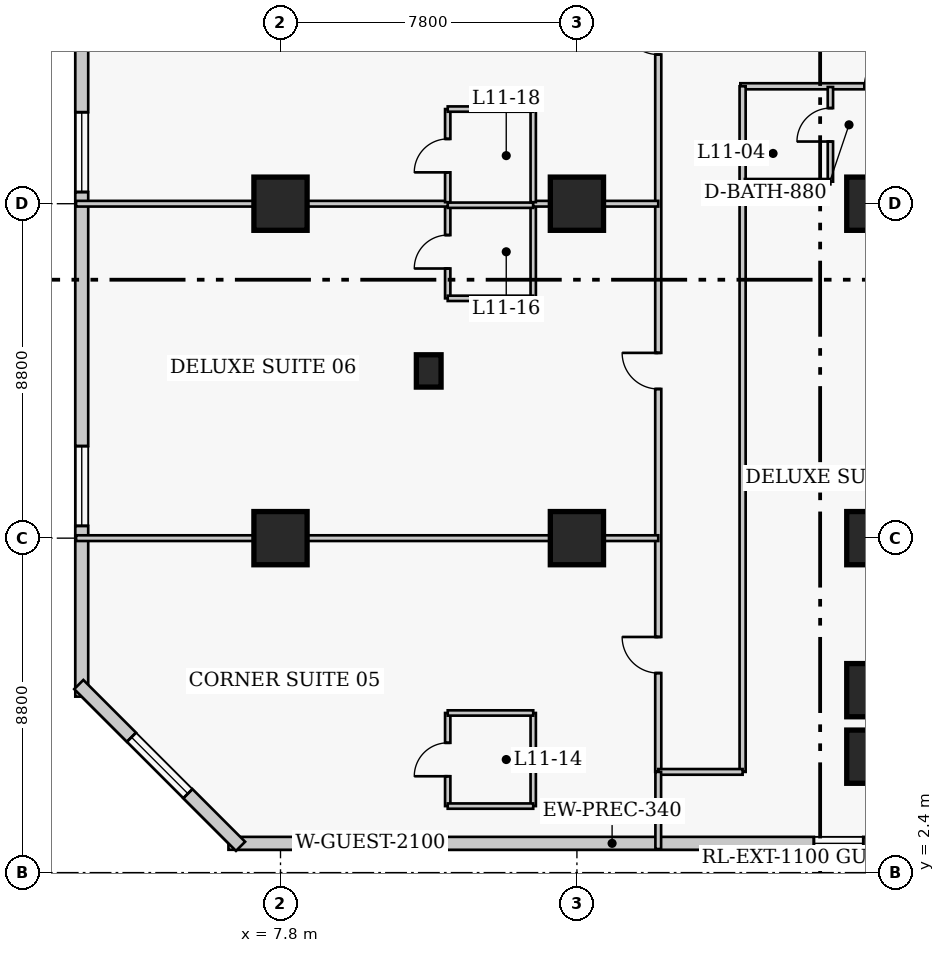
"""IFC4 building model, lengths in metres.
Left out: names, types, materials, properties, quantities, classifications, styles, units other than length and angle.
Written with IfcOpenShell. Run it as: python <this file> out.ifc"""

import sys

from ifc_helpers import new_model, si_unit, direction, frame, frame_2d, origin, origin_2d, place, context, subcontext, project, spatial, rectangle, extrude, element, fill, save


model = new_model("IFC4")
c1 = context("Model", 3, precision=1e-05, world=origin(), true_north=direction((0.0, 1.0)))
c2 = subcontext(c1, "Body", "Model", "MODEL_VIEW")
j1 = project(units=[si_unit("LENGTHUNIT", "METRE"), si_unit("PLANEANGLEUNIT", "RADIAN")], contexts=[c1])
p1 = place(None, origin())
s1 = spatial("IfcSite", under=j1, at=p1, CompositionType="ELEMENT")
p2 = place(p1, origin())
s2 = spatial("IfcBuilding", under=s1, at=p2, CompositionType="ELEMENT")
p3 = place(p2, frame((0.0, 0.0, 48.8)))
s3 = spatial("IfcBuildingStorey", under=s2, at=p3, CompositionType="ELEMENT", Elevation=48.8)
for number, where, z_axis, x_axis in (
    (1, (7.8, 11.2, 0.0), (0.0, 0.0, 1.0), (1.0, 0.0, 0.0)),
    (2, (7.8, 20.0, 0.0), (0.0, 0.0, 1.0), (1.0, 0.0, 0.0)),
    (3, (15.6, 11.2, 0.0), (0.0, 0.0, 1.0), (1.0, 0.0, 0.0)),
    (4, (15.6, 20.0, 0.0), (0.0, 0.0, 1.0), (1.0, 0.0, 0.0)),
    (5, (23.4, 11.2, 0.0), (0.0, 0.0, 1.0), (1.0, 0.0, 0.0)),
    (6, (23.4, 20.0, 0.0), (0.0, 0.0, 1.0), (1.0, 0.0, 0.0)),
    (7, (23.4, 7.2, 0.0), (0.0, 0.0, 1.0), (1.0, 0.0, 0.0)),
    (8, (23.4, 5.45, 0.0), (0.0, 0.0, 1.0), (1.0, 0.0, 0.0)),
):
    element("IfcColumn", number, at=place(p3, frame(where, z_axis=z_axis, x_axis=x_axis)), inside=s3, PredefinedType="COLUMN", context=c2, shape_type="SweptSolid", body=[
        extrude(rectangle(XDim=1.4, YDim=1.4, at=origin_2d()), origin(), (0.0, 0.0, 1.0), 3.8),
    ])
p4 = place(p3, frame((11.7, 15.6, 0.0), z_axis=(0.0, 0.0, 1.0), x_axis=(1.0, 0.0, 0.0)))
e9 = element("IfcColumn", 9, at=p4, inside=s3, PredefinedType="PILASTER", context=c2, shape_type="SweptSolid", body=[
    extrude(rectangle(XDim=0.65, YDim=0.85, at=origin_2d()), origin(), (0.0, 0.0, 1.0), 3.8),
])
p5 = place(p3, frame((6.43, 3.17, 0.0), z_axis=(0.0, 0.0, 1.0), x_axis=(1.0, 0.0, 0.0)))
e10 = element("IfcWall", 10, at=p5, inside=s3, PredefinedType="SOLIDWALL", context=c2, shape_type="SweptSolid", body=[
    extrude(rectangle(XDim=29.89, YDim=0.34, at=frame_2d((14.945, 0.0))), origin(), (0.0, 0.0, 1.0), 3.54),
])
p6 = place(p5, frame((20.17, 0.0, 0.0)))
e11 = element("IfcOpeningElement", 11, at=p6, cuts=e10, PredefinedType="OPENING", context=c2, shape_type="SweptSolid", body=[
    extrude(rectangle(XDim=1.4, YDim=2.15, at=frame_2d((0.7, 1.075))), frame((0.0, 0.18, 0.0), z_axis=(0.0, -1.0, 0.0), x_axis=(1.0, 0.0, 0.0)), (0.0, 0.0, 1.0), 0.36),
])
p7 = place(p5, frame((2.686, 0.0, 0.85)))
e12 = element("IfcOpeningElement", 12, at=p7, cuts=e10, PredefinedType="OPENING", context=c2, shape_type="SweptSolid", body=[
    extrude(rectangle(XDim=2.1, YDim=1.85, at=frame_2d((1.05, 0.925))), frame((0.0, 0.18, 0.0), z_axis=(0.0, -1.0, 0.0), x_axis=(1.0, 0.0, 0.0)), (0.0, 0.0, 1.0), 0.36),
])
p8 = place(p5, frame((25.104, 0.0, 0.85)))
e13 = element("IfcOpeningElement", 13, at=p8, cuts=e10, PredefinedType="OPENING", context=c2, shape_type="SweptSolid", body=[
    extrude(rectangle(XDim=2.1, YDim=1.85, at=frame_2d((1.05, 0.925))), frame((0.0, 0.18, 0.0), z_axis=(0.0, -1.0, 0.0), x_axis=(1.0, 0.0, 0.0)), (0.0, 0.0, 1.0), 0.36),
])
p9 = place(p5, frame((15.405, 0.0, 0.85)))
e14 = element("IfcOpeningElement", 14, at=p9, cuts=e10, PredefinedType="OPENING", context=c2, shape_type="SweptSolid", body=[
    extrude(rectangle(XDim=1.3, YDim=1.7, at=frame_2d((0.65, 0.85))), frame((0.0, 0.18, 0.0), z_axis=(0.0, -1.0, 0.0), x_axis=(1.0, 0.0, 0.0)), (0.0, 0.0, 1.0), 0.36),
])
p10 = place(p3, frame((2.57, 42.17, 0.0), z_axis=(0.0, 0.0, 1.0), x_axis=(0.0, -1.0, 0.0)))
e15 = element("IfcWall", 15, at=p10, inside=s3, PredefinedType="SOLIDWALL", context=c2, shape_type="SweptSolid", body=[
    extrude(rectangle(XDim=35.14, YDim=0.34, at=frame_2d((17.57, 0.0))), origin(), (0.0, 0.0, 1.0), 3.54),
])
p11 = place(p10, frame((2.692, 0.0, 0.85)))
e16 = element("IfcOpeningElement", 16, at=p11, cuts=e15, PredefinedType="OPENING", context=c2, shape_type="SweptSolid", body=[
    extrude(rectangle(XDim=2.1, YDim=1.85, at=frame_2d((1.05, 0.925))), frame((0.0, 0.18, 0.0), z_axis=(0.0, -1.0, 0.0), x_axis=(1.0, 0.0, 0.0)), (0.0, 0.0, 1.0), 0.36),
])
p12 = place(p10, frame((10.978, 0.0, 0.85)))
e17 = element("IfcOpeningElement", 17, at=p12, cuts=e15, PredefinedType="OPENING", context=c2, shape_type="SweptSolid", body=[
    extrude(rectangle(XDim=2.1, YDim=1.85, at=frame_2d((1.05, 0.925))), frame((0.0, 0.18, 0.0), z_axis=(0.0, -1.0, 0.0), x_axis=(1.0, 0.0, 0.0)), (0.0, 0.0, 1.0), 0.36),
])
p13 = place(p10, frame((19.762, 0.0, 0.85)))
e18 = element("IfcOpeningElement", 18, at=p13, cuts=e15, PredefinedType="OPENING", context=c2, shape_type="SweptSolid", body=[
    extrude(rectangle(XDim=2.1, YDim=1.85, at=frame_2d((1.05, 0.925))), frame((0.0, 0.18, 0.0), z_axis=(0.0, -1.0, 0.0), x_axis=(1.0, 0.0, 0.0)), (0.0, 0.0, 1.0), 0.36),
])
p14 = place(p10, frame((28.548, 0.0, 0.85)))
e19 = element("IfcOpeningElement", 19, at=p14, cuts=e15, PredefinedType="OPENING", context=c2, shape_type="SweptSolid", body=[
    extrude(rectangle(XDim=2.1, YDim=1.85, at=frame_2d((1.05, 0.925))), frame((0.0, 0.18, 0.0), z_axis=(0.0, -1.0, 0.0), x_axis=(1.0, 0.0, 0.0)), (0.0, 0.0, 1.0), 0.36),
])
p15 = place(p3, frame((2.492, 7.348, 0.0), z_axis=(0.0, 0.0, 1.0), x_axis=(0.707106781187, -0.707106781187, 0.0)))
e20 = element("IfcWall", 20, at=p15, inside=s3, PredefinedType="SOLIDWALL", context=c2, shape_type="SweptSolid", body=[
    extrude(rectangle(XDim=6.02, YDim=0.34, at=frame_2d((3.01, 0.0))), origin(), (0.0, 0.0, 1.0), 3.54),
])
p16 = place(p15, frame((1.96, 0.0, 0.85)))
e21 = element("IfcOpeningElement", 21, at=p16, cuts=e20, PredefinedType="OPENING", context=c2, shape_type="SweptSolid", body=[
    extrude(rectangle(XDim=2.1, YDim=1.85, at=frame_2d((1.05, 0.925))), frame((0.0, 0.18, 0.0), z_axis=(0.0, -1.0, 0.0), x_axis=(1.0, 0.0, 0.0)), (0.0, 0.0, 1.0), 0.36),
])
p17 = place(p3, frame((19.9, 23.09, 0.0), z_axis=(0.0, 0.0, 1.0), x_axis=(1.0, 0.0, 0.0)))
e22 = element("IfcWall", 22, at=p17, inside=s3, PredefinedType="PARTITIONING", context=c2, shape_type="SweptSolid", body=[
    extrude(rectangle(XDim=15.9, YDim=0.16, at=frame_2d((7.95, 0.0))), origin(), (0.0, 0.0, 1.0), 3.54),
])
p18 = place(p17, frame((3.265, 0.0, 0.0)))
e23 = element("IfcOpeningElement", 23, at=p18, cuts=e22, PredefinedType="OPENING", context=c2, shape_type="SweptSolid", body=[
    extrude(rectangle(XDim=0.95, YDim=2.1, at=frame_2d((0.475, 1.05))), frame((0.0, 0.09, 0.0), z_axis=(0.0, -1.0, 0.0), x_axis=(1.0, 0.0, 0.0)), (0.0, 0.0, 1.0), 0.18),
])
p19 = place(p17, frame((8.315, 0.0, 0.0)))
e24 = element("IfcOpeningElement", 24, at=p19, cuts=e22, PredefinedType="OPENING", context=c2, shape_type="SweptSolid", body=[
    extrude(rectangle(XDim=0.95, YDim=2.1, at=frame_2d((0.475, 1.05))), frame((0.0, 0.09, 0.0), z_axis=(0.0, -1.0, 0.0), x_axis=(1.0, 0.0, 0.0)), (0.0, 0.0, 1.0), 0.18),
])
p20 = place(p17, frame((12.53, 0.0, 0.0)))
e25 = element("IfcOpeningElement", 25, at=p20, cuts=e22, PredefinedType="OPENING", context=c2, shape_type="SweptSolid", body=[
    extrude(rectangle(XDim=1.0, YDim=2.15, at=frame_2d((0.5, 1.075))), frame((0.0, 0.09, 0.0), z_axis=(0.0, -1.0, 0.0), x_axis=(1.0, 0.0, 0.0)), (0.0, 0.0, 1.0), 0.18),
])
p21 = place(p3, frame((17.74, 5.05, 0.0), z_axis=(0.0, 0.0, 1.0), x_axis=(0.0, 1.0, 0.0)))
e26 = element("IfcWall", 26, at=p21, inside=s3, PredefinedType="PARTITIONING", context=c2, shape_type="SweptSolid", body=[
    extrude(rectangle(XDim=35.6, YDim=0.16, at=frame_2d((17.8, 0.0))), origin(), (0.0, 0.0, 1.0), 3.54),
])
p22 = place(p21, frame((2.6, 0.0, 0.0)))
e27 = element("IfcOpeningElement", 27, at=p22, cuts=e26, PredefinedType="OPENING", context=c2, shape_type="SweptSolid", body=[
    extrude(rectangle(XDim=0.95, YDim=2.1, at=frame_2d((0.475, 1.05))), frame((0.0, 0.09, 0.0), z_axis=(0.0, -1.0, 0.0), x_axis=(1.0, 0.0, 0.0)), (0.0, 0.0, 1.0), 0.18),
])
p23 = place(p21, frame((10.075, 0.0, 0.0)))
e28 = element("IfcOpeningElement", 28, at=p23, cuts=e26, PredefinedType="OPENING", context=c2, shape_type="SweptSolid", body=[
    extrude(rectangle(XDim=0.95, YDim=2.1, at=frame_2d((0.475, 1.05))), frame((0.0, 0.09, 0.0), z_axis=(0.0, -1.0, 0.0), x_axis=(1.0, 0.0, 0.0)), (0.0, 0.0, 1.0), 0.18),
])
p24 = place(p21, frame((18.875, 0.0, 0.0)))
e29 = element("IfcOpeningElement", 29, at=p24, cuts=e26, PredefinedType="OPENING", context=c2, shape_type="SweptSolid", body=[
    extrude(rectangle(XDim=0.95, YDim=2.1, at=frame_2d((0.475, 1.05))), frame((0.0, 0.09, 0.0), z_axis=(0.0, -1.0, 0.0), x_axis=(1.0, 0.0, 0.0)), (0.0, 0.0, 1.0), 0.18),
])
p25 = place(p21, frame((27.275, 0.0, 0.0)))
e30 = element("IfcOpeningElement", 30, at=p25, cuts=e26, PredefinedType="OPENING", context=c2, shape_type="SweptSolid", body=[
    extrude(rectangle(XDim=0.95, YDim=2.1, at=frame_2d((0.475, 1.05))), frame((0.0, 0.09, 0.0), z_axis=(0.0, -1.0, 0.0), x_axis=(1.0, 0.0, 0.0)), (0.0, 0.0, 1.0), 0.18),
])
p26 = place(p21, frame((33.986, 0.0, 0.0)))
e31 = element("IfcOpeningElement", 31, at=p26, cuts=e26, PredefinedType="OPENING", context=c2, shape_type="SweptSolid", body=[
    extrude(rectangle(XDim=1.0, YDim=2.15, at=frame_2d((0.5, 1.075))), frame((0.0, 0.09, 0.0), z_axis=(0.0, -1.0, 0.0), x_axis=(1.0, 0.0, 0.0)), (0.0, 0.0, 1.0), 0.18),
])
p27 = place(p3, frame((19.96, 5.05, 0.0), z_axis=(0.0, 0.0, 1.0), x_axis=(0.0, 1.0, 0.0)))
e32 = element("IfcWall", 32, at=p27, inside=s3, PredefinedType="PARTITIONING", context=c2, shape_type="SweptSolid", body=[
    extrude(rectangle(XDim=18.04, YDim=0.16, at=frame_2d((9.02, 0.0))), origin(), (0.0, 0.0, 1.0), 3.54),
])
p28 = place(p3, frame((17.74, 5.05, 0.0), z_axis=(0.0, 0.0, 1.0), x_axis=(1.0, 0.0, 0.0)))
e33 = element("IfcWall", 33, at=p28, inside=s3, PredefinedType="PARTITIONING", context=c2, shape_type="SweptSolid", body=[
    extrude(rectangle(XDim=2.22, YDim=0.15, at=frame_2d((1.11, 0.0))), origin(), (0.0, 0.0, 1.0), 3.54),
])
p29 = place(p3, frame((22.27, 20.58, 0.0), z_axis=(0.0, 0.0, 1.0), x_axis=(0.0, 1.0, 0.0)))
e34 = element("IfcWall", 34, at=p29, inside=s3, PredefinedType="PLUMBINGWALL", context=c2, shape_type="SweptSolid", body=[
    extrude(rectangle(XDim=2.49, YDim=0.14, at=frame_2d((1.245, 0.0))), origin(), (0.0, 0.0, 1.0), 3.54),
])
p30 = place(p29, frame((1.056, 0.0, 0.0)))
e35 = element("IfcOpeningElement", 35, at=p30, cuts=e34, PredefinedType="OPENING", context=c2, shape_type="SweptSolid", body=[
    extrude(rectangle(XDim=0.88, YDim=2.05, at=frame_2d((0.44, 1.025))), frame((0.0, 0.08, 0.0), z_axis=(0.0, -1.0, 0.0), x_axis=(1.0, 0.0, 0.0)), (0.0, 0.0, 1.0), 0.16),
])
p31 = place(p3, frame((20.02, 20.58, 0.0), z_axis=(0.0, 0.0, 1.0), x_axis=(1.0, 0.0, 0.0)))
e36 = element("IfcWall", 36, at=p31, inside=s3, PredefinedType="PLUMBINGWALL", context=c2, shape_type="SweptSolid", body=[
    extrude(rectangle(XDim=2.25, YDim=0.14, at=frame_2d((1.125, 0.0))), origin(), (0.0, 0.0, 1.0), 3.54),
])
p32 = place(p3, frame((17.74, 3.02, 0.0), z_axis=(0.0, 0.0, 1.0), x_axis=(0.0, 1.0, 0.0)))
e37 = element("IfcWall", 37, at=p32, inside=s3, PredefinedType="PARTITIONING", context=c2, shape_type="SweptSolid", body=[
    extrude(rectangle(XDim=2.03, YDim=0.15, at=frame_2d((1.015, 0.0))), origin(), (0.0, 0.0, 1.0), 3.54),
])
p33 = place(p3, frame((12.2, 4.15, 0.0), z_axis=(0.0, 0.0, 1.0), x_axis=(0.0, 1.0, 0.0)))
e38 = element("IfcWall", 38, at=p33, inside=s3, PredefinedType="PLUMBINGWALL", context=c2, shape_type="SweptSolid", body=[
    extrude(rectangle(XDim=2.45, YDim=0.14, at=frame_2d((1.225, 0.0))), origin(), (0.0, 0.0, 1.0), 3.54),
])
p34 = place(p33, frame((0.785, 0.0, 0.0)))
e39 = element("IfcOpeningElement", 39, at=p34, cuts=e38, PredefinedType="OPENING", context=c2, shape_type="SweptSolid", body=[
    extrude(rectangle(XDim=0.88, YDim=2.05, at=frame_2d((0.44, 1.025))), frame((0.0, 0.08, 0.0), z_axis=(0.0, -1.0, 0.0), x_axis=(1.0, 0.0, 0.0)), (0.0, 0.0, 1.0), 0.16),
])
p35 = place(p3, frame((14.45, 4.15, 0.0), z_axis=(0.0, 0.0, 1.0), x_axis=(0.0, 1.0, 0.0)))
e40 = element("IfcWall", 40, at=p35, inside=s3, PredefinedType="PLUMBINGWALL", context=c2, shape_type="SweptSolid", body=[
    extrude(rectangle(XDim=2.45, YDim=0.14, at=frame_2d((1.225, 0.0))), origin(), (0.0, 0.0, 1.0), 3.54),
])
for number, where, z_axis, x_axis in (
    (41, (12.2, 4.15, 0.0), (0.0, 0.0, 1.0), (1.0, 0.0, 0.0)),
    (42, (12.2, 6.6, 0.0), (0.0, 0.0, 1.0), (1.0, 0.0, 0.0)),
):
    element("IfcWall", number, at=place(p3, frame(where, z_axis=z_axis, x_axis=x_axis)), inside=s3, PredefinedType="PLUMBINGWALL", context=c2, shape_type="SweptSolid", body=[
        extrude(rectangle(XDim=2.25, YDim=0.14, at=frame_2d((1.125, 0.0))), origin(), (0.0, 0.0, 1.0), 3.54),
    ])
p36 = place(p3, frame((2.42, 11.2, 0.0), z_axis=(0.0, 0.0, 1.0), x_axis=(1.0, 0.0, 0.0)))
e43 = element("IfcWall", 43, at=p36, inside=s3, PredefinedType="PARTITIONING", context=c2, shape_type="SweptSolid", body=[
    extrude(rectangle(XDim=15.32, YDim=0.15, at=frame_2d((7.66, 0.0))), origin(), (0.0, 0.0, 1.0), 2.593),
])
p37 = place(p3, frame((12.2, 17.51, 0.0), z_axis=(0.0, 0.0, 1.0), x_axis=(0.0, 1.0, 0.0)))
e44 = element("IfcWall", 44, at=p37, inside=s3, PredefinedType="PLUMBINGWALL", context=c2, shape_type="SweptSolid", body=[
    extrude(rectangle(XDim=2.45, YDim=0.14, at=frame_2d((1.225, 0.0))), origin(), (0.0, 0.0, 1.0), 3.54),
])
p38 = place(p37, frame((0.785, 0.0, 0.0)))
e45 = element("IfcOpeningElement", 45, at=p38, cuts=e44, PredefinedType="OPENING", context=c2, shape_type="SweptSolid", body=[
    extrude(rectangle(XDim=0.88, YDim=2.05, at=frame_2d((0.44, 1.025))), frame((0.0, 0.08, 0.0), z_axis=(0.0, -1.0, 0.0), x_axis=(1.0, 0.0, 0.0)), (0.0, 0.0, 1.0), 0.16),
])
p39 = place(p3, frame((14.45, 17.51, 0.0), z_axis=(0.0, 0.0, 1.0), x_axis=(0.0, 1.0, 0.0)))
e46 = element("IfcWall", 46, at=p39, inside=s3, PredefinedType="PLUMBINGWALL", context=c2, shape_type="SweptSolid", body=[
    extrude(rectangle(XDim=2.45, YDim=0.14, at=frame_2d((1.225, 0.0))), origin(), (0.0, 0.0, 1.0), 3.54),
])
p40 = place(p3, frame((12.2, 17.51, 0.0), z_axis=(0.0, 0.0, 1.0), x_axis=(1.0, 0.0, 0.0)))
e47 = element("IfcWall", 47, at=p40, inside=s3, PredefinedType="PLUMBINGWALL", context=c2, shape_type="SweptSolid", body=[
    extrude(rectangle(XDim=2.25, YDim=0.14, at=frame_2d((1.125, 0.0))), origin(), (0.0, 0.0, 1.0), 3.54),
])
p41 = place(p3, frame((12.2, 19.96, 0.0), z_axis=(0.0, 0.0, 1.0), x_axis=(1.0, 0.0, 0.0)))
e48 = element("IfcWall", 48, at=p41, inside=s3, PredefinedType="PLUMBINGWALL", context=c2, shape_type="SweptSolid", body=[
    extrude(rectangle(XDim=2.25, YDim=0.14, at=frame_2d((1.125, 0.0))), origin(), (0.0, 0.0, 1.0), 2.593),
])
p42 = place(p3, frame((2.42, 20.0, 0.0), z_axis=(0.0, 0.0, 1.0), x_axis=(1.0, 0.0, 0.0)))
e49 = element("IfcWall", 49, at=p42, inside=s3, PredefinedType="PARTITIONING", context=c2, shape_type="SweptSolid", body=[
    extrude(rectangle(XDim=9.78, YDim=0.15, at=frame_2d((4.89, 0.0))), origin(), (0.0, 0.0, 1.0), 2.593),
])
p43 = place(p3, frame((14.45, 20.0, 0.0), z_axis=(0.0, 0.0, 1.0), x_axis=(1.0, 0.0, 0.0)))
e50 = element("IfcWall", 50, at=p43, inside=s3, PredefinedType="PARTITIONING", context=c2, shape_type="SweptSolid", body=[
    extrude(rectangle(XDim=3.29, YDim=0.15, at=frame_2d((1.645, 0.0))), origin(), (0.0, 0.0, 1.0), 2.593),
])
p44 = place(p3, frame((12.2, 20.04, 0.0), z_axis=(0.0, 0.0, 1.0), x_axis=(0.0, 1.0, 0.0)))
e51 = element("IfcWall", 51, at=p44, inside=s3, PredefinedType="PLUMBINGWALL", context=c2, shape_type="SweptSolid", body=[
    extrude(rectangle(XDim=2.45, YDim=0.14, at=frame_2d((1.225, 0.0))), origin(), (0.0, 0.0, 1.0), 3.54),
])
p45 = place(p44, frame((0.785, 0.0, 0.0)))
e52 = element("IfcOpeningElement", 52, at=p45, cuts=e51, PredefinedType="OPENING", context=c2, shape_type="SweptSolid", body=[
    extrude(rectangle(XDim=0.88, YDim=2.05, at=frame_2d((0.44, 1.025))), frame((0.0, 0.08, 0.0), z_axis=(0.0, -1.0, 0.0), x_axis=(1.0, 0.0, 0.0)), (0.0, 0.0, 1.0), 0.16),
])
p46 = place(p3, frame((14.45, 20.04, 0.0), z_axis=(0.0, 0.0, 1.0), x_axis=(0.0, 1.0, 0.0)))
e53 = element("IfcWall", 53, at=p46, inside=s3, PredefinedType="PLUMBINGWALL", context=c2, shape_type="SweptSolid", body=[
    extrude(rectangle(XDim=2.45, YDim=0.14, at=frame_2d((1.225, 0.0))), origin(), (0.0, 0.0, 1.0), 3.54),
])
p47 = place(p3, frame((12.2, 22.49, 0.0), z_axis=(0.0, 0.0, 1.0), x_axis=(1.0, 0.0, 0.0)))
e54 = element("IfcWall", 54, at=p47, inside=s3, PredefinedType="PLUMBINGWALL", context=c2, shape_type="SweptSolid", body=[
    extrude(rectangle(XDim=2.25, YDim=0.14, at=frame_2d((1.125, 0.0))), origin(), (0.0, 0.0, 1.0), 3.54),
])
p48 = place(p7, origin())
e55 = element("IfcWindow", 55, at=p48, inside=s3, PartitioningType="SINGLE_PANEL", PredefinedType="WINDOW", context=c2, shape_type="SweptSolid", body=[
    extrude(rectangle(XDim=2.1, YDim=1.85, at=frame_2d((1.05, 0.925))), frame((0.0, 0.03, 0.0), z_axis=(0.0, -1.0, 0.0), x_axis=(1.0, 0.0, 0.0)), (0.0, 0.0, 1.0), 0.06),
])
fill(e12, e55)
p49 = place(p13, origin())
e56 = element("IfcWindow", 56, at=p49, inside=s3, PartitioningType="SINGLE_PANEL", PredefinedType="WINDOW", context=c2, shape_type="SweptSolid", body=[
    extrude(rectangle(XDim=2.1, YDim=1.85, at=frame_2d((1.05, 0.925))), frame((0.0, 0.03, 0.0), z_axis=(0.0, -1.0, 0.0), x_axis=(1.0, 0.0, 0.0)), (0.0, 0.0, 1.0), 0.06),
])
fill(e18, e56)
p50 = place(p14, origin())
e57 = element("IfcWindow", 57, at=p50, inside=s3, PartitioningType="SINGLE_PANEL", PredefinedType="WINDOW", context=c2, shape_type="SweptSolid", body=[
    extrude(rectangle(XDim=2.1, YDim=1.85, at=frame_2d((1.05, 0.925))), frame((0.0, 0.03, 0.0), z_axis=(0.0, -1.0, 0.0), x_axis=(1.0, 0.0, 0.0)), (0.0, 0.0, 1.0), 0.06),
])
fill(e19, e57)
p51 = place(p16, origin())
e58 = element("IfcWindow", 58, at=p51, inside=s3, PartitioningType="SINGLE_PANEL", PredefinedType="WINDOW", context=c2, shape_type="SweptSolid", body=[
    extrude(rectangle(XDim=2.1, YDim=1.85, at=frame_2d((1.05, 0.925))), frame((0.0, 0.03, 0.0), z_axis=(0.0, -1.0, 0.0), x_axis=(1.0, 0.0, 0.0)), (0.0, 0.0, 1.0), 0.06),
])
fill(e21, e58)
p52 = place(p9, origin())
e59 = element("IfcWindow", 59, at=p52, inside=s3, PartitioningType="SINGLE_PANEL", PredefinedType="WINDOW", context=c2, shape_type="SweptSolid", body=[
    extrude(rectangle(XDim=1.3, YDim=1.7, at=frame_2d((0.65, 0.85))), frame((0.0, 0.03, 0.0), z_axis=(0.0, -1.0, 0.0), x_axis=(1.0, 0.0, 0.0)), (0.0, 0.0, 1.0), 0.06),
])
fill(e14, e59)
p53 = place(p30, origin())
e60 = element("IfcDoor", 60, at=p53, inside=s3, OperationType="SINGLE_SWING_LEFT", PredefinedType="DOOR", context=c2, shape_type="SweptSolid", body=[
    extrude(rectangle(XDim=0.88, YDim=2.05, at=frame_2d((0.44, 1.025))), frame((0.0, 0.025, 0.0), z_axis=(0.0, -1.0, 0.0), x_axis=(1.0, 0.0, 0.0)), (0.0, 0.0, 1.0), 0.05),
])
fill(e35, e60)
p54 = place(p18, origin())
e61 = element("IfcDoor", 61, at=p54, inside=s3, OperationType="SINGLE_SWING_RIGHT", PredefinedType="DOOR", context=c2, shape_type="SweptSolid", body=[
    extrude(rectangle(XDim=0.95, YDim=2.1, at=frame_2d((0.475, 1.05))), frame((0.0, 0.025, 0.0), z_axis=(0.0, -1.0, 0.0), x_axis=(1.0, 0.0, 0.0)), (0.0, 0.0, 1.0), 0.05),
])
fill(e23, e61)
p55 = place(p34, origin())
e62 = element("IfcDoor", 62, at=p55, inside=s3, OperationType="SINGLE_SWING_LEFT", PredefinedType="DOOR", context=c2, shape_type="SweptSolid", body=[
    extrude(rectangle(XDim=0.88, YDim=2.05, at=frame_2d((0.44, 1.025))), frame((0.0, 0.025, 0.0), z_axis=(0.0, -1.0, 0.0), x_axis=(1.0, 0.0, 0.0)), (0.0, 0.0, 1.0), 0.05),
])
fill(e39, e62)
p56 = place(p22, origin())
e63 = element("IfcDoor", 63, at=p56, inside=s3, OperationType="SINGLE_SWING_RIGHT", PredefinedType="DOOR", context=c2, shape_type="SweptSolid", body=[
    extrude(rectangle(XDim=0.95, YDim=2.1, at=frame_2d((0.475, 1.05))), frame((0.0, 0.025, 0.0), z_axis=(0.0, -1.0, 0.0), x_axis=(1.0, 0.0, 0.0)), (0.0, 0.0, 1.0), 0.05),
])
fill(e27, e63)
p57 = place(p38, origin())
e64 = element("IfcDoor", 64, at=p57, inside=s3, OperationType="SINGLE_SWING_LEFT", PredefinedType="DOOR", context=c2, shape_type="SweptSolid", body=[
    extrude(rectangle(XDim=0.88, YDim=2.05, at=frame_2d((0.44, 1.025))), frame((0.0, 0.025, 0.0), z_axis=(0.0, -1.0, 0.0), x_axis=(1.0, 0.0, 0.0)), (0.0, 0.0, 1.0), 0.05),
])
fill(e45, e64)
p58 = place(p23, origin())
e65 = element("IfcDoor", 65, at=p58, inside=s3, OperationType="SINGLE_SWING_RIGHT", PredefinedType="DOOR", context=c2, shape_type="SweptSolid", body=[
    extrude(rectangle(XDim=0.95, YDim=2.1, at=frame_2d((0.475, 1.05))), frame((0.0, 0.025, 0.0), z_axis=(0.0, -1.0, 0.0), x_axis=(1.0, 0.0, 0.0)), (0.0, 0.0, 1.0), 0.05),
])
fill(e28, e65)
p59 = place(p45, origin())
e66 = element("IfcDoor", 66, at=p59, inside=s3, OperationType="SINGLE_SWING_LEFT", PredefinedType="DOOR", context=c2, shape_type="SweptSolid", body=[
    extrude(rectangle(XDim=0.88, YDim=2.05, at=frame_2d((0.44, 1.025))), frame((0.0, 0.025, 0.0), z_axis=(0.0, -1.0, 0.0), x_axis=(1.0, 0.0, 0.0)), (0.0, 0.0, 1.0), 0.05),
])
fill(e52, e66)
p60 = place(p24, origin())
e67 = element("IfcDoor", 67, at=p60, inside=s3, OperationType="SINGLE_SWING_RIGHT", PredefinedType="DOOR", context=c2, shape_type="SweptSolid", body=[
    extrude(rectangle(XDim=0.95, YDim=2.1, at=frame_2d((0.475, 1.05))), frame((0.0, 0.025, 0.0), z_axis=(0.0, -1.0, 0.0), x_axis=(1.0, 0.0, 0.0)), (0.0, 0.0, 1.0), 0.05),
])
fill(e29, e67)
save(model, sys.argv[1])
